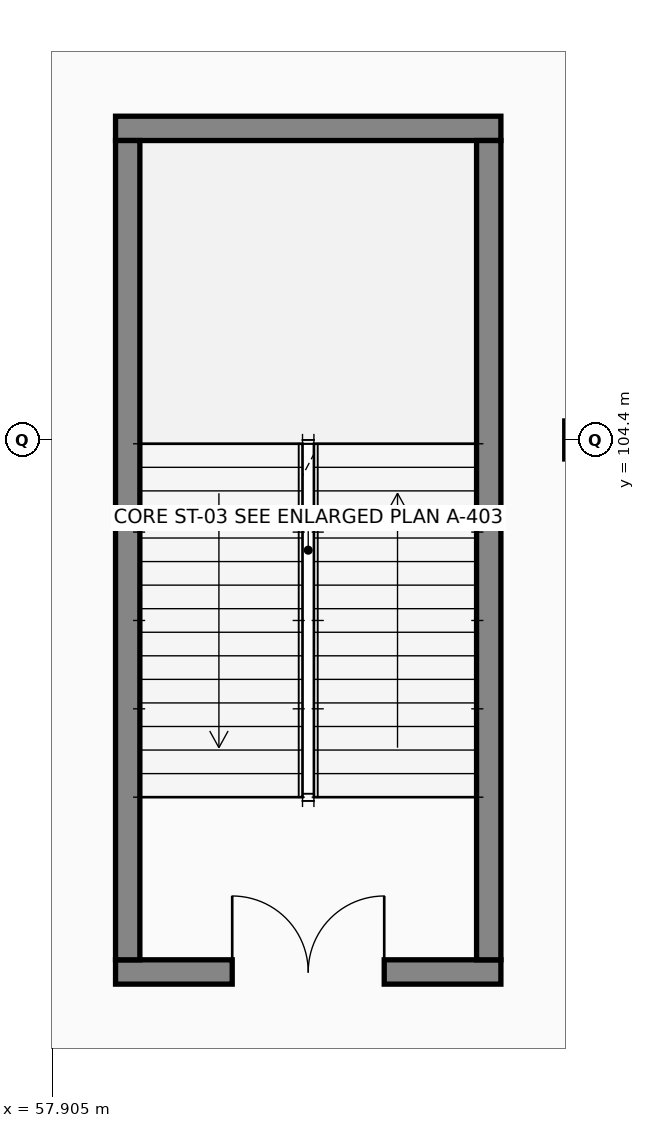
"""IFC4 building model, lengths in metres.
Left out: names, types, materials, properties, quantities, classifications, styles, units other than length and angle.
Written with IfcOpenShell. Run it as: python <this file> out.ifc"""

import sys

from ifc_helpers import new_model, si_unit, direction, frame, frame_2d, origin, place, context, subcontext, project, spatial, rectangle, extrude, element, fill, save


model = new_model("IFC4")
c1 = context("Model", 3, precision=1e-05, world=origin(), true_north=direction((0.0, 1.0)))
c2 = subcontext(c1, "Body", "Model", "MODEL_VIEW")
j1 = project(units=[si_unit("LENGTHUNIT", "METRE"), si_unit("PLANEANGLEUNIT", "RADIAN")], contexts=[c1])
p1 = place(None, origin())
s1 = spatial("IfcSite", under=j1, at=p1, CompositionType="ELEMENT")
p2 = place(p1, origin())
s2 = spatial("IfcBuilding", under=s1, at=p2, CompositionType="ELEMENT")
p3 = place(p2, frame((0.0, 0.0, 4.8)))
s3 = spatial("IfcBuildingStorey", under=s2, at=p3, CompositionType="ELEMENT", Elevation=4.8)
p4 = place(p3, frame((58.74, 97.4, 0.0), z_axis=(0.0, 0.0, 1.0), x_axis=(1.0, 0.0, 0.0)))
e1 = element("IfcWall", 1, at=p4, inside=s3, PredefinedType="SHEAR", context=c2, shape_type="SweptSolid", body=[
    extrude(rectangle(XDim=5.07, YDim=0.32, at=frame_2d((2.535, 0.0))), origin(), (0.0, 0.0, 1.0), 4.56),
])
p5 = place(p4, frame((1.535, 0.0, 0.0)))
e2 = element("IfcOpeningElement", 2, at=p5, cuts=e1, PredefinedType="OPENING", context=c2, shape_type="SweptSolid", body=[
    extrude(rectangle(XDim=2.0, YDim=2.15, at=frame_2d((1.0, 1.075))), frame((0.0, 0.17, 0.0), z_axis=(0.0, -1.0, 0.0), x_axis=(1.0, 0.0, 0.0)), (0.0, 0.0, 1.0), 0.34),
])
p6 = place(p3, frame((58.74, 108.5, 0.0), z_axis=(0.0, 0.0, 1.0), x_axis=(1.0, 0.0, 0.0)))
e3 = element("IfcWall", 3, at=p6, inside=s3, PredefinedType="SHEAR", context=c2, shape_type="SweptSolid", body=[
    extrude(rectangle(XDim=5.07, YDim=0.32, at=frame_2d((2.535, 0.0))), origin(), (0.0, 0.0, 1.0), 4.56),
])
for number, where, z_axis, x_axis in (
    (4, (58.9, 97.56, 0.0), (0.0, 0.0, 1.0), (0.0, 1.0, 0.0)),
    (5, (63.65, 97.56, 0.0), (0.0, 0.0, 1.0), (0.0, 1.0, 0.0)),
):
    element("IfcWall", number, at=place(p3, frame(where, z_axis=z_axis, x_axis=x_axis)), inside=s3, PredefinedType="SHEAR", context=c2, shape_type="SweptSolid", body=[
        extrude(rectangle(XDim=10.78, YDim=0.32, at=frame_2d((5.39, 0.0))), origin(), (0.0, 0.0, 1.0), 4.56),
    ])
p7 = place(p5, origin())
e6 = element("IfcDoor", 6, at=p7, inside=s3, OperationType="DOUBLE_DOOR_SINGLE_SWING", PredefinedType="DOOR", context=c2, shape_type="SweptSolid", body=[
    extrude(rectangle(XDim=2.0, YDim=2.15, at=frame_2d((1.0, 1.075))), frame((0.0, 0.025, 0.0), z_axis=(0.0, -1.0, 0.0), x_axis=(1.0, 0.0, 0.0)), (0.0, 0.0, 1.0), 0.05),
])
fill(e2, e6)
save(model, sys.argv[1])
